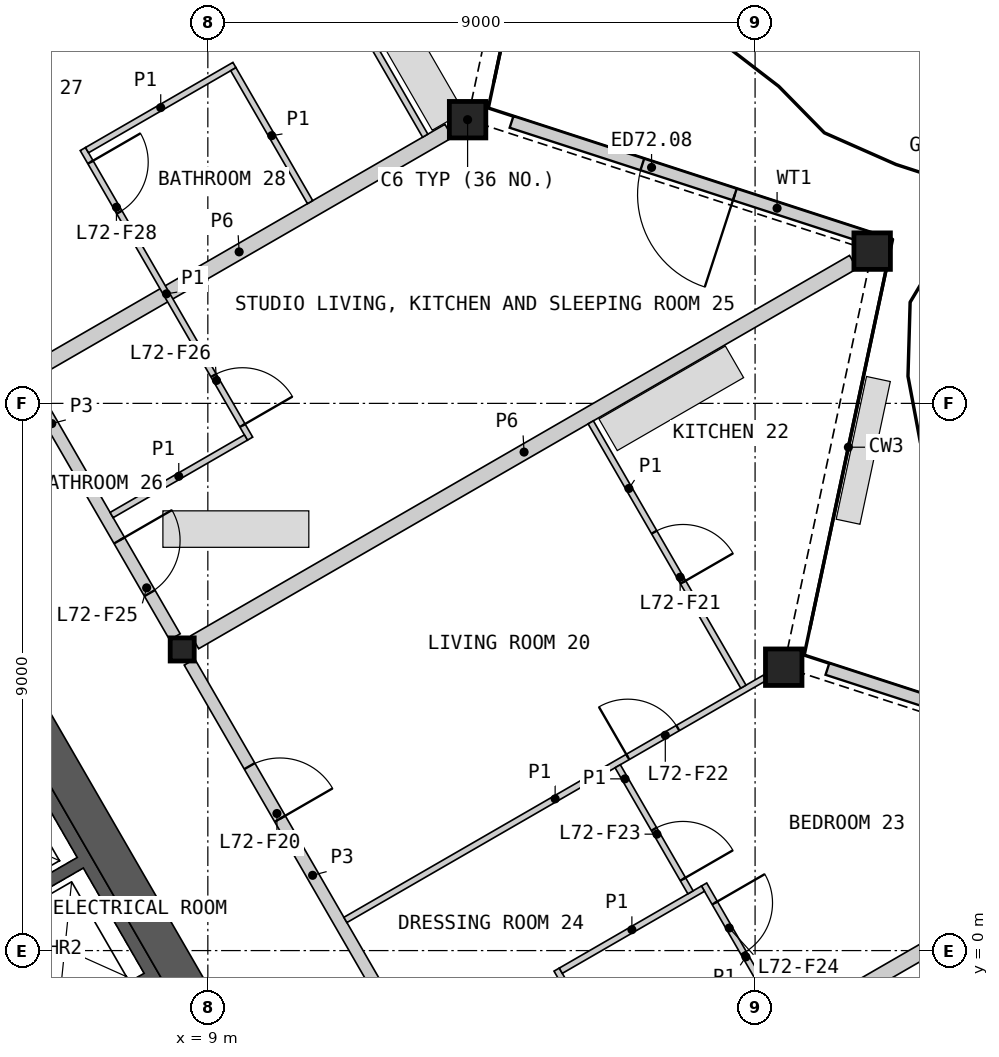
"""IFC4 building model, lengths in metres.
Left out: names, types, materials, properties, quantities, classifications, styles, units other than length and angle.
Written with IfcOpenShell. Run it as: python <this file> out.ifc"""

import sys

from ifc_helpers import new_model, si_unit, direction, frame, frame_2d, origin, origin_2d, place, context, subcontext, project, spatial, polyline, rectangle, hollow_rectangle, i_section, outline, extrude, element, fill, save


model = new_model("IFC4")
c1 = context("Model", 3, precision=1e-05, world=origin(), true_north=direction((0.0, 1.0)))
c2 = subcontext(c1, "Body", "Model", "MODEL_VIEW")
j1 = project(units=[si_unit("LENGTHUNIT", "METRE"), si_unit("PLANEANGLEUNIT", "RADIAN")], contexts=[c1])
p1 = place(None, origin())
s1 = spatial("IfcSite", under=j1, at=p1, CompositionType="ELEMENT")
p2 = place(p1, origin())
s2 = spatial("IfcBuilding", under=s1, at=p2, CompositionType="ELEMENT")
p3 = place(p2, frame((0.0, 0.0, 325.6)))
s3 = spatial("IfcBuildingStorey", under=s2, at=p3, CompositionType="ELEMENT", Elevation=325.6)
for number, where, z_axis, x_axis in (
    (1, (18.471, 4.661, 0.0), (0.0, 0.0, 1.0), (1.0, 0.0, 0.0)),
    (2, (19.926, 11.504, 0.0), (0.0, 0.0, 1.0), (1.0, 0.0, 0.0)),
    (3, (13.272, 13.666, 0.0), (0.0, 0.0, 1.0), (1.0, 0.0, 0.0)),
):
    element("IfcColumn", number, at=place(p3, frame(where, z_axis=z_axis, x_axis=x_axis)), inside=s3, PredefinedType="COLUMN", context=c2, shape_type="SweptSolid", body=[
        extrude(hollow_rectangle(XDim=0.6, YDim=0.6, WallThickness=0.04, at=origin_2d()), origin(), (0.0, 0.0, 1.0), 3.4),
    ])
p4 = place(p3, frame((8.578, 4.953, 0.0), z_axis=(0.0, 0.0, 1.0), x_axis=(1.0, 0.0, 0.0)))
e4 = element("IfcColumn", 4, at=p4, inside=s3, PredefinedType="COLUMN", context=c2, shape_type="SweptSolid", body=[
    extrude(i_section(OverallWidth=0.396, OverallDepth=0.381, WebThickness=0.019, FlangeThickness=0.03, at=origin_2d()), origin(), (0.0, 0.0, 1.0), 3.4),
])
p5 = place(p3, frame((25.012, 2.739, 0.0), z_axis=(0.0, 0.0, 1.0), x_axis=(-0.951056631566, 0.309016639608, 0.0)))
e5 = element("IfcWall", 5, at=p5, inside=s3, PredefinedType="SOLIDWALL", context=c2, shape_type="SweptSolid", body=[
    extrude(rectangle(XDim=6.122, YDim=0.2, at=frame_2d((3.061, 0.0))), origin(), (0.0, 0.0, 1.0), 2.488),
])
p6 = place(p5, frame((2.261, 0.0, 0.0)))
e6 = element("IfcOpeningElement", 6, at=p6, cuts=e5, PredefinedType="OPENING", context=c2, shape_type="SweptSolid", body=[
    extrude(rectangle(XDim=1.6, YDim=2.25, at=frame_2d((0.8, 1.125))), frame((0.0, 0.11, 0.0), z_axis=(0.0, -1.0, 0.0), x_axis=(1.0, 0.0, 0.0)), (0.0, 0.0, 1.0), 0.22),
])
p7 = place(p3, frame((19.817, 11.737, 0.0), z_axis=(0.0, 0.0, 1.0), x_axis=(-0.951056631566, 0.309016639608, 0.0)))
e7 = element("IfcWall", 7, at=p7, inside=s3, PredefinedType="SOLIDWALL", context=c2, shape_type="SweptSolid", body=[
    extrude(rectangle(XDim=6.122, YDim=0.2, at=frame_2d((3.061, 0.0))), origin(), (0.0, 0.0, 1.0), 2.488),
])
p8 = place(p7, frame((2.261, 0.0, 0.0)))
e8 = element("IfcOpeningElement", 8, at=p8, cuts=e7, PredefinedType="OPENING", context=c2, shape_type="SweptSolid", body=[
    extrude(rectangle(XDim=1.6, YDim=2.25, at=frame_2d((0.8, 1.125))), frame((0.0, 0.11, 0.0), z_axis=(0.0, -1.0, 0.0), x_axis=(1.0, 0.0, 0.0)), (0.0, 0.0, 1.0), 0.22),
])
p9 = place(p3, origin())
e9 = element("IfcWall", 9, at=p9, inside=s3, PredefinedType="SHEAR", context=c2, shape_type="SweptSolid", body=[
    extrude(outline(polyline([(1.561, 6.097), (3.731, 7.35), (8.231, -0.444), (6.061, -1.697), (5.96, -1.524), (7.952, -0.374), (6.952, 1.358), (4.96, 0.208), (4.861, 0.381), (6.852, 1.531), (5.852, 3.263), (3.861, 2.113), (3.76, 2.287), (5.752, 3.437), (4.752, 5.169), (2.76, 4.019), (2.66, 4.192), (4.652, 5.342), (3.652, 7.074), (1.66, 5.924), (1.561, 6.097)])), origin(), (0.0, 0.0, 1.0), 3.1),
])
p10 = place(p3, frame((8.686, -0.634, 0.0), z_axis=(0.0, 0.0, 1.0), x_axis=(-0.500004601921, 0.866022746848, 0.0)))
e10 = element("IfcWall", 10, at=p10, inside=s3, PredefinedType="SHEAR", context=c2, shape_type="SweptSolid", body=[
    extrude(rectangle(XDim=16.853, YDim=0.6, at=frame_2d((8.426, 0.0))), origin(), (0.0, 0.0, 1.0), 3.1),
])
p11 = place(p3, frame((8.786, 5.073, 0.0), z_axis=(0.0, 0.0, 1.0), x_axis=(0.86602139559, 0.500006942333, 0.0)))
e11 = element("IfcWall", 11, at=p11, inside=s3, PredefinedType="PARTITIONING", context=c2, shape_type="SweptSolid", body=[
    extrude(rectangle(XDim=12.505, YDim=0.25, at=frame_2d((6.252, 0.0))), origin(), (0.0, 0.0, 1.0), 2.33),
])
p12 = place(p3, frame((4.409, 12.174, 0.0), z_axis=(0.0, 0.0, 1.0), x_axis=(0.499984266882, -0.866034487114, 0.0)))
e12 = element("IfcWall", 12, at=p12, inside=s3, PredefinedType="PARTITIONING", context=c2, shape_type="SweptSolid", body=[
    extrude(rectangle(XDim=8.099, YDim=0.2, at=frame_2d((4.049, 0.0))), origin(), (0.0, 0.0, 1.0), 3.1),
])
p13 = place(p12, frame((6.269, 0.0, 0.0)))
e13 = element("IfcOpeningElement", 13, at=p13, cuts=e12, PredefinedType="OPENING", context=c2, shape_type="SweptSolid", body=[
    extrude(rectangle(XDim=1.0, YDim=2.1, at=frame_2d((0.5, 1.05))), frame((0.0, 0.11, 0.0), z_axis=(0.0, -1.0, 0.0), x_axis=(1.0, 0.0, 0.0)), (0.0, 0.0, 1.0), 0.22),
])
p14 = place(p12, frame((1.164, 0.0, 0.0)))
e14 = element("IfcOpeningElement", 14, at=p14, cuts=e12, PredefinedType="OPENING", context=c2, shape_type="SweptSolid", body=[
    extrude(rectangle(XDim=1.0, YDim=2.1, at=frame_2d((0.5, 1.05))), frame((0.0, 0.11, 0.0), z_axis=(0.0, -1.0, 0.0), x_axis=(1.0, 0.0, 0.0)), (0.0, 0.0, 1.0), 0.22),
])
p15 = place(p3, frame((8.698, 4.745, 0.0), z_axis=(0.0, 0.0, 1.0), x_axis=(0.499984266882, -0.866034487114, 0.0)))
e15 = element("IfcWall", 15, at=p15, inside=s3, PredefinedType="PARTITIONING", context=c2, shape_type="SweptSolid", body=[
    extrude(rectangle(XDim=8.099, YDim=0.2, at=frame_2d((4.049, 0.0))), origin(), (0.0, 0.0, 1.0), 3.1),
])
p16 = place(p15, frame((1.976, 0.0, 0.0)))
e16 = element("IfcOpeningElement", 16, at=p16, cuts=e15, PredefinedType="OPENING", context=c2, shape_type="SweptSolid", body=[
    extrude(rectangle(XDim=1.0, YDim=2.1, at=frame_2d((0.5, 1.05))), frame((0.0, 0.11, 0.0), z_axis=(0.0, -1.0, 0.0), x_axis=(1.0, 0.0, 0.0)), (0.0, 0.0, 1.0), 0.22),
])
p17 = place(p3, frame((6.068, 9.501, 0.0), z_axis=(0.0, 0.0, 1.0), x_axis=(0.866022671543, 0.50000473235, 0.0)))
e17 = element("IfcWall", 17, at=p17, inside=s3, PredefinedType="PARTITIONING", context=c2, shape_type="SweptSolid", body=[
    extrude(rectangle(XDim=7.961, YDim=0.25, at=frame_2d((3.98, 0.0))), origin(), (0.0, 0.0, 1.0), 2.33),
])
p18 = place(p3, frame((18.58, -1.27, 0.0), z_axis=(0.0, 0.0, 1.0), x_axis=(0.866024647952, 0.500001309137, 0.0)))
e18 = element("IfcWall", 18, at=p18, inside=s3, PredefinedType="PARTITIONING", context=c2, shape_type="SweptSolid", body=[
    extrude(rectangle(XDim=7.2, YDim=0.25, at=frame_2d((3.6, 0.0))), origin(), (0.0, 0.0, 1.0), 2.33),
])
p19 = place(p3, frame((3.47, 14.0, 0.0), z_axis=(0.0, 0.0, 1.0), x_axis=(0.866021216079, 0.500007253249, 0.0)))
e19 = element("IfcWall", 19, at=p19, inside=s3, PredefinedType="PARTITIONING", context=c2, shape_type="SweptSolid", body=[
    extrude(rectangle(XDim=12.639, YDim=0.1, at=frame_2d((6.32, 0.0))), origin(), (0.0, 0.0, 1.0), 2.33),
])
p20 = place(p19, frame((8.314, 0.0, 0.0)))
e20 = element("IfcOpeningElement", 20, at=p20, cuts=e19, PredefinedType="OPENING", context=c2, shape_type="SweptSolid", body=[
    extrude(rectangle(XDim=0.95, YDim=2.1, at=frame_2d((0.475, 1.05))), frame((0.0, 0.06, 0.0), z_axis=(0.0, -1.0, 0.0), x_axis=(1.0, 0.0, 0.0)), (0.0, 0.0, 1.0), 0.12),
])
p21 = place(p3, frame((11.262, 0.504, 0.0), z_axis=(0.0, 0.0, 1.0), x_axis=(0.866020217342, 0.500008983073, 0.0)))
e21 = element("IfcWall", 21, at=p21, inside=s3, PredefinedType="PARTITIONING", context=c2, shape_type="SweptSolid", body=[
    extrude(rectangle(XDim=7.966, YDim=0.1, at=frame_2d((3.983, 0.0))), origin(), (0.0, 0.0, 1.0), 2.33),
])
p22 = place(p21, frame((5.362, 0.0, 0.0)))
e22 = element("IfcOpeningElement", 22, at=p22, cuts=e21, PredefinedType="OPENING", context=c2, shape_type="SweptSolid", body=[
    extrude(rectangle(XDim=0.95, YDim=2.1, at=frame_2d((0.475, 1.05))), frame((0.0, 0.06, 0.0), z_axis=(0.0, -1.0, 0.0), x_axis=(1.0, 0.0, 0.0)), (0.0, 0.0, 1.0), 0.12),
])
p23 = place(p3, frame((17.161, 1.087, 0.0), z_axis=(0.0, 0.0, 1.0), x_axis=(0.499996545922, -0.866027397988, 0.0)))
e23 = element("IfcWall", 23, at=p23, inside=s3, PredefinedType="PARTITIONING", context=c2, shape_type="SweptSolid", body=[
    extrude(rectangle(XDim=5.5, YDim=0.1, at=frame_2d((2.75, 0.0))), origin(), (0.0, 0.0, 1.0), 2.33),
])
p24 = place(p23, frame((4.3, 0.0, 0.0)))
e24 = element("IfcOpeningElement", 24, at=p24, cuts=e23, PredefinedType="OPENING", context=c2, shape_type="SweptSolid", body=[
    extrude(rectangle(XDim=0.95, YDim=2.1, at=frame_2d((0.475, 1.05))), frame((0.0, 0.06, 0.0), z_axis=(0.0, -1.0, 0.0), x_axis=(1.0, 0.0, 0.0)), (0.0, 0.0, 1.0), 0.12),
])
p25 = place(p23, frame((0.351, 0.0, 0.0)))
e25 = element("IfcOpeningElement", 25, at=p25, cuts=e23, PredefinedType="OPENING", context=c2, shape_type="SweptSolid", body=[
    extrude(rectangle(XDim=0.95, YDim=2.1, at=frame_2d((0.475, 1.05))), frame((0.0, 0.06, 0.0), z_axis=(0.0, -1.0, 0.0), x_axis=(1.0, 0.0, 0.0)), (0.0, 0.0, 1.0), 0.12),
])
p26 = place(p3, frame((14.736, -0.313, 0.0), z_axis=(0.0, 0.0, 1.0), x_axis=(0.49997732567, -0.866038494419, 0.0)))
e26 = element("IfcWall", 26, at=p26, inside=s3, PredefinedType="PARTITIONING", context=c2, shape_type="SweptSolid", body=[
    extrude(rectangle(XDim=5.5, YDim=0.1, at=frame_2d((2.75, 0.0))), origin(), (0.0, 0.0, 1.0), 2.33),
])
p27 = place(p3, frame((6.944, 13.183, 0.0), z_axis=(0.0, 0.0, 1.0), x_axis=(0.499996545922, -0.866027397988, 0.0)))
e27 = element("IfcWall", 27, at=p27, inside=s3, PredefinedType="PARTITIONING", context=c2, shape_type="SweptSolid", body=[
    extrude(rectangle(XDim=5.5, YDim=0.1, at=frame_2d((2.75, 0.0))), origin(), (0.0, 0.0, 1.0), 2.33),
])
p28 = place(p27, frame((4.3, 0.0, 0.0)))
e28 = element("IfcOpeningElement", 28, at=p28, cuts=e27, PredefinedType="OPENING", context=c2, shape_type="SweptSolid", body=[
    extrude(rectangle(XDim=0.95, YDim=2.1, at=frame_2d((0.475, 1.05))), frame((0.0, 0.06, 0.0), z_axis=(0.0, -1.0, 0.0), x_axis=(1.0, 0.0, 0.0)), (0.0, 0.0, 1.0), 0.12),
])
p29 = place(p27, frame((0.25, 0.0, 0.0)))
e29 = element("IfcOpeningElement", 29, at=p29, cuts=e27, PredefinedType="OPENING", context=c2, shape_type="SweptSolid", body=[
    extrude(rectangle(XDim=0.95, YDim=2.1, at=frame_2d((0.475, 1.05))), frame((0.0, 0.06, 0.0), z_axis=(0.0, -1.0, 0.0), x_axis=(1.0, 0.0, 0.0)), (0.0, 0.0, 1.0), 0.12),
])
p30 = place(p3, frame((10.065, 17.75, 0.0), z_axis=(0.0, 0.0, 1.0), x_axis=(0.499989096993, -0.866031698547, 0.0)))
e30 = element("IfcWall", 30, at=p30, inside=s3, PredefinedType="PARTITIONING", context=c2, shape_type="SweptSolid", body=[
    extrude(rectangle(XDim=5.02, YDim=0.1, at=frame_2d((2.51, 0.0))), origin(), (0.0, 0.0, 1.0), 2.33),
])
p31 = place(p30, frame((0.862, 0.0, 0.0)))
e31 = element("IfcOpeningElement", 31, at=p31, cuts=e30, PredefinedType="OPENING", context=c2, shape_type="SweptSolid", body=[
    extrude(rectangle(XDim=0.95, YDim=2.1, at=frame_2d((0.475, 1.05))), frame((0.0, 0.06, 0.0), z_axis=(0.0, -1.0, 0.0), x_axis=(1.0, 0.0, 0.0)), (0.0, 0.0, 1.0), 0.12),
])
p32 = place(p3, frame((15.297, 8.688, 0.0), z_axis=(0.0, 0.0, 1.0), x_axis=(0.499989096993, -0.866031698547, 0.0)))
e32 = element("IfcWall", 32, at=p32, inside=s3, PredefinedType="PARTITIONING", context=c2, shape_type="SweptSolid", body=[
    extrude(rectangle(XDim=5.02, YDim=0.1, at=frame_2d((2.51, 0.0))), origin(), (0.0, 0.0, 1.0), 2.33),
])
p33 = place(p32, frame((2.086, 0.0, 0.0)))
e33 = element("IfcOpeningElement", 33, at=p33, cuts=e32, PredefinedType="OPENING", context=c2, shape_type="SweptSolid", body=[
    extrude(rectangle(XDim=0.95, YDim=2.1, at=frame_2d((0.475, 1.05))), frame((0.0, 0.06, 0.0), z_axis=(0.0, -1.0, 0.0), x_axis=(1.0, 0.0, 0.0)), (0.0, 0.0, 1.0), 0.12),
])
p34 = place(p3, frame((7.013, 13.165, 0.0), z_axis=(0.0, 0.0, 1.0), x_axis=(0.866034573852, 0.49998411664, 0.0)))
e34 = element("IfcWall", 34, at=p34, inside=s3, PredefinedType="PARTITIONING", context=c2, shape_type="SweptSolid", body=[
    extrude(rectangle(XDim=2.8, YDim=0.1, at=frame_2d((1.4, 0.0))), origin(), (0.0, 0.0, 1.0), 2.33),
])
p35 = place(p3, frame((14.805, -0.331, 0.0), z_axis=(0.0, 0.0, 1.0), x_axis=(0.866059108428, 0.4999416173, 0.0)))
e35 = element("IfcWall", 35, at=p35, inside=s3, PredefinedType="PARTITIONING", context=c2, shape_type="SweptSolid", body=[
    extrude(rectangle(XDim=2.7, YDim=0.1, at=frame_2d((1.35, 0.0))), origin(), (0.0, 0.0, 1.0), 2.33),
])
p36 = place(p3, frame((7.418, 7.163, 0.0), z_axis=(0.0, 0.0, 1.0), x_axis=(0.866054858364, 0.499948979701, 0.0)))
e36 = element("IfcWall", 36, at=p36, inside=s3, PredefinedType="PARTITIONING", context=c2, shape_type="SweptSolid", body=[
    extrude(rectangle(XDim=2.55, YDim=0.1, at=frame_2d((1.275, 0.0))), origin(), (0.0, 0.0, 1.0), 2.33),
])
p37 = place(p3, frame((9.419, 14.497, 0.0), z_axis=(0.0, 0.0, 1.0), x_axis=(0.499976333282, -0.866039067339, 0.0)))
e37 = element("IfcWall", 37, at=p37, inside=s3, PredefinedType="PARTITIONING", context=c2, shape_type="SweptSolid", body=[
    extrude(rectangle(XDim=2.525, YDim=0.1, at=frame_2d((1.262, 0.0))), origin(), (0.0, 0.0, 1.0), 2.33),
])
p38 = place(p3, frame((15.74, 3.032, 0.0), z_axis=(0.0, 0.0, 1.0), x_axis=(0.500075453945, -0.865981836046, 0.0)))
e38 = element("IfcWall", 38, at=p38, inside=s3, PredefinedType="PARTITIONING", context=c2, shape_type="SweptSolid", body=[
    extrude(rectangle(XDim=2.395, YDim=0.1, at=frame_2d((1.197, 0.0))), origin(), (0.0, 0.0, 1.0), 2.33),
])
p39 = place(p38, frame((1.195, 0.0, 0.0)))
e39 = element("IfcOpeningElement", 39, at=p39, cuts=e38, PredefinedType="OPENING", context=c2, shape_type="SweptSolid", body=[
    extrude(rectangle(XDim=0.95, YDim=2.1, at=frame_2d((0.475, 1.05))), frame((0.0, 0.06, 0.0), z_axis=(0.0, -1.0, 0.0), x_axis=(1.0, 0.0, 0.0)), (0.0, 0.0, 1.0), 0.12),
])
p40 = place(p8, origin())
e40 = element("IfcDoor", 40, at=p40, inside=s3, OperationType="DOUBLE_DOOR_SINGLE_SWING", PredefinedType="DOOR", context=c2, shape_type="SweptSolid", body=[
    extrude(rectangle(XDim=1.6, YDim=2.25, at=frame_2d((0.8, 1.125))), frame((0.0, 0.025, 0.0), z_axis=(0.0, -1.0, 0.0), x_axis=(1.0, 0.0, 0.0)), (0.0, 0.0, 1.0), 0.05),
])
fill(e8, e40)
p41 = place(p16, origin())
e41 = element("IfcDoor", 41, at=p41, inside=s3, OperationType="SINGLE_SWING_RIGHT", PredefinedType="DOOR", context=c2, shape_type="SweptSolid", body=[
    extrude(rectangle(XDim=1.0, YDim=2.1, at=frame_2d((0.5, 1.05))), frame((0.0, 0.025, 0.0), z_axis=(0.0, -1.0, 0.0), x_axis=(1.0, 0.0, 0.0)), (0.0, 0.0, 1.0), 0.05),
])
fill(e16, e41)
p42 = place(p33, origin())
e42 = element("IfcDoor", 42, at=p42, inside=s3, OperationType="SINGLE_SWING_RIGHT", PredefinedType="DOOR", context=c2, shape_type="SweptSolid", body=[
    extrude(rectangle(XDim=0.95, YDim=2.1, at=frame_2d((0.475, 1.05))), frame((0.0, 0.025, 0.0), z_axis=(0.0, -1.0, 0.0), x_axis=(1.0, 0.0, 0.0)), (0.0, 0.0, 1.0), 0.05),
])
fill(e33, e42)
p43 = place(p22, origin())
e43 = element("IfcDoor", 43, at=p43, inside=s3, OperationType="SINGLE_SWING_LEFT", PredefinedType="DOOR", context=c2, shape_type="SweptSolid", body=[
    extrude(rectangle(XDim=0.95, YDim=2.1, at=frame_2d((0.475, 1.05))), frame((0.0, 0.025, 0.0), z_axis=(0.0, -1.0, 0.0), x_axis=(1.0, 0.0, 0.0)), (0.0, 0.0, 1.0), 0.05),
])
fill(e22, e43)
p44 = place(p39, origin())
e44 = element("IfcDoor", 44, at=p44, inside=s3, OperationType="SINGLE_SWING_RIGHT", PredefinedType="DOOR", context=c2, shape_type="SweptSolid", body=[
    extrude(rectangle(XDim=0.95, YDim=2.1, at=frame_2d((0.475, 1.05))), frame((0.0, 0.025, 0.0), z_axis=(0.0, -1.0, 0.0), x_axis=(1.0, 0.0, 0.0)), (0.0, 0.0, 1.0), 0.05),
])
fill(e39, e44)
p45 = place(p25, origin())
e45 = element("IfcDoor", 45, at=p45, inside=s3, OperationType="SINGLE_SWING_LEFT", PredefinedType="DOOR", context=c2, shape_type="SweptSolid", body=[
    extrude(rectangle(XDim=0.95, YDim=2.1, at=frame_2d((0.475, 1.05))), frame((0.0, 0.025, 0.0), z_axis=(0.0, -1.0, 0.0), x_axis=(1.0, 0.0, 0.0)), (0.0, 0.0, 1.0), 0.05),
])
fill(e25, e45)
p46 = place(p13, origin())
e46 = element("IfcDoor", 46, at=p46, inside=s3, OperationType="SINGLE_SWING_LEFT", PredefinedType="DOOR", context=c2, shape_type="SweptSolid", body=[
    extrude(rectangle(XDim=1.0, YDim=2.1, at=frame_2d((0.5, 1.05))), frame((0.0, 0.025, 0.0), z_axis=(0.0, -1.0, 0.0), x_axis=(1.0, 0.0, 0.0)), (0.0, 0.0, 1.0), 0.05),
])
fill(e13, e46)
p47 = place(p28, origin())
e47 = element("IfcDoor", 47, at=p47, inside=s3, OperationType="SINGLE_SWING_RIGHT", PredefinedType="DOOR", context=c2, shape_type="SweptSolid", body=[
    extrude(rectangle(XDim=0.95, YDim=2.1, at=frame_2d((0.475, 1.05))), frame((0.0, 0.025, 0.0), z_axis=(0.0, -1.0, 0.0), x_axis=(1.0, 0.0, 0.0)), (0.0, 0.0, 1.0), 0.05),
])
fill(e28, e47)
p48 = place(p29, origin())
e48 = element("IfcDoor", 48, at=p48, inside=s3, OperationType="SINGLE_SWING_LEFT", PredefinedType="DOOR", context=c2, shape_type="SweptSolid", body=[
    extrude(rectangle(XDim=0.95, YDim=2.1, at=frame_2d((0.475, 1.05))), frame((0.0, 0.025, 0.0), z_axis=(0.0, -1.0, 0.0), x_axis=(1.0, 0.0, 0.0)), (0.0, 0.0, 1.0), 0.05),
])
fill(e29, e48)
save(model, sys.argv[1])
